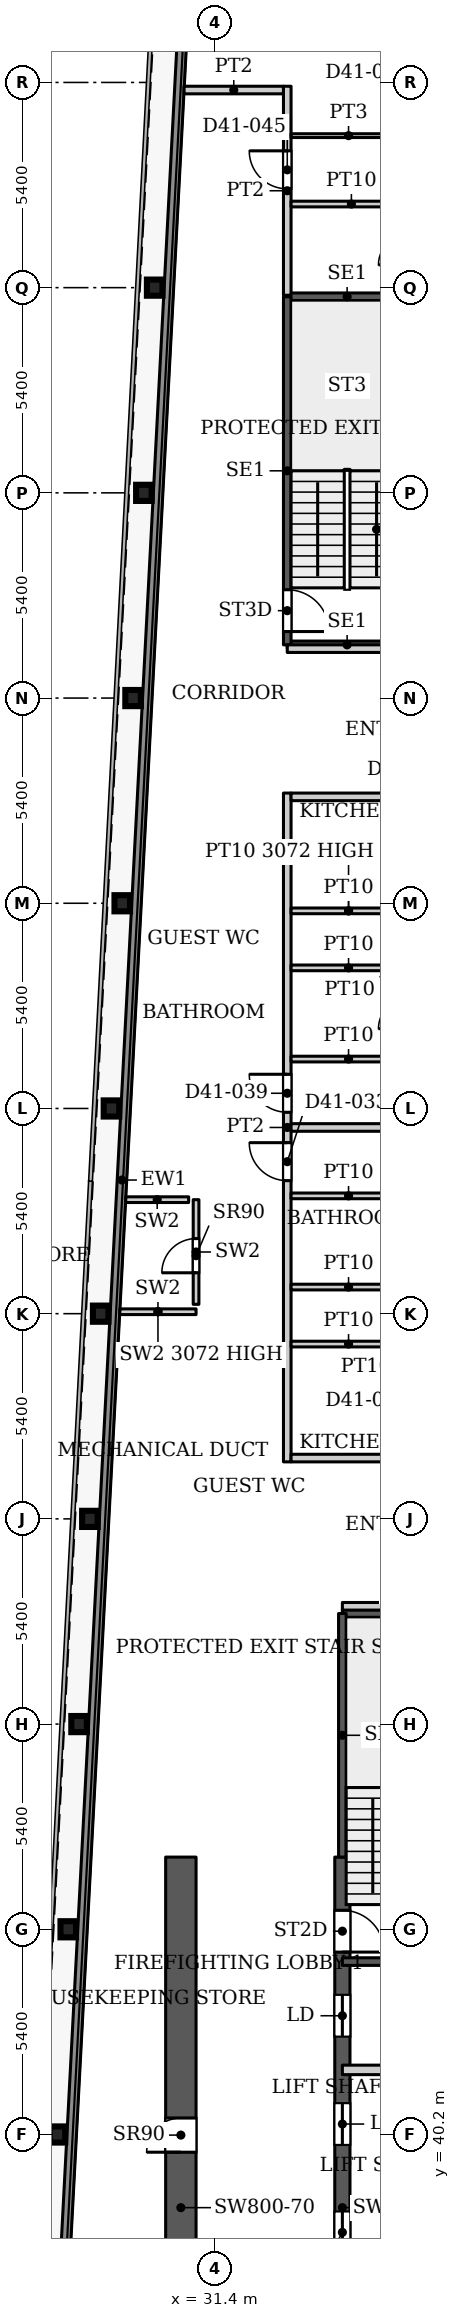
"""IFC4 building model, lengths in metres.
Left out: names, types, materials, properties, quantities, classifications, styles, units other than length and angle.
Written with IfcOpenShell. Run it as: python <this file> out.ifc"""

import sys

from ifc_helpers import new_model, si_unit, direction, frame, frame_2d, origin, origin_2d, place, context, subcontext, project, spatial, rectangle, i_section, extrude, source, transform, mapped, element, fill, save


model = new_model("IFC4")
c1 = context("Model", 3, precision=1e-05, world=origin(), true_north=direction((0.0, 1.0)))
c2 = subcontext(c1, "Body", "Model", "MODEL_VIEW")
j1 = project(units=[si_unit("LENGTHUNIT", "METRE"), si_unit("PLANEANGLEUNIT", "RADIAN")], contexts=[c1])
p1 = place(None, origin())
s1 = spatial("IfcSite", under=j1, at=p1, CompositionType="ELEMENT")
p2 = place(p1, origin())
s2 = spatial("IfcBuilding", under=s1, at=p2, CompositionType="ELEMENT")
p3 = place(p2, frame((0.0, 0.0, 176.0)))
s3 = spatial("IfcBuildingStorey", under=s2, at=p3, CompositionType="ELEMENT", Elevation=176.0)
for number, where, z_axis, x_axis in (
    (1, (27.253, 40.2, 0.0), (0.0, 0.0, 1.0), (1.0, 0.0, 0.0)),
    (2, (27.537, 45.6, 0.0), (0.0, 0.0, 1.0), (1.0, 0.0, 0.0)),
    (3, (27.822, 51.0, 0.0), (0.0, 0.0, 1.0), (1.0, 0.0, 0.0)),
    (4, (28.106, 56.4, 0.0), (0.0, 0.0, 1.0), (1.0, 0.0, 0.0)),
    (5, (28.39, 61.8, 0.0), (0.0, 0.0, 1.0), (1.0, 0.0, 0.0)),
    (6, (28.674, 67.2, 0.0), (0.0, 0.0, 1.0), (1.0, 0.0, 0.0)),
    (7, (28.958, 72.6, 0.0), (0.0, 0.0, 1.0), (1.0, 0.0, 0.0)),
    (8, (29.243, 78.0, 0.0), (0.0, 0.0, 1.0), (1.0, 0.0, 0.0)),
    (9, (29.527, 83.4, 0.0), (0.0, 0.0, 1.0), (1.0, 0.0, 0.0)),
    (10, (29.811, 88.8, 0.0), (0.0, 0.0, 1.0), (1.0, 0.0, 0.0)),
):
    element("IfcColumn", number, at=place(p3, frame(where, z_axis=z_axis, x_axis=x_axis)), inside=s3, PredefinedType="COLUMN", context=c2, shape_type="SweptSolid", body=[
        extrude(i_section(OverallWidth=0.409, OverallDepth=0.425, WebThickness=0.033, FlangeThickness=0.052, FilletRadius=0.013, at=origin_2d()), origin(), (0.0, 0.0, 1.0), 3.9),
    ])
p4 = place(p3, frame((34.75, 29.05, 0.0), z_axis=(0.0, 0.0, 1.0), x_axis=(0.0, 1.0, 0.0)))
e11 = element("IfcWall", 11, at=p4, inside=s3, PredefinedType="SHEAR", context=c2, shape_type="SweptSolid", body=[
    extrude(rectangle(XDim=18.45, YDim=0.4, at=frame_2d((9.225, 0.0))), origin(), (0.0, 0.0, 1.0), 3.9),
])
p5 = place(p4, frame((8.025, 0.0, 0.0)))
e12 = element("IfcOpeningElement", 12, at=p5, cuts=e11, PredefinedType="OPENING", context=c2, shape_type="SweptSolid", body=[
    extrude(rectangle(XDim=1.1, YDim=2.2, at=frame_2d((0.55, 1.1))), frame((0.0, 0.21, 0.0), z_axis=(0.0, -1.0, 0.0), x_axis=(1.0, 0.0, 0.0)), (0.0, 0.0, 1.0), 0.42),
])
p6 = place(p4, frame((10.875, 0.0, 0.0)))
e13 = element("IfcOpeningElement", 13, at=p6, cuts=e11, PredefinedType="OPENING", context=c2, shape_type="SweptSolid", body=[
    extrude(rectangle(XDim=1.1, YDim=2.2, at=frame_2d((0.55, 1.1))), frame((0.0, 0.21, 0.0), z_axis=(0.0, -1.0, 0.0), x_axis=(1.0, 0.0, 0.0)), (0.0, 0.0, 1.0), 0.42),
])
p7 = place(p4, frame((13.725, 0.0, 0.0)))
e14 = element("IfcOpeningElement", 14, at=p7, cuts=e11, PredefinedType="OPENING", context=c2, shape_type="SweptSolid", body=[
    extrude(rectangle(XDim=1.1, YDim=2.2, at=frame_2d((0.55, 1.1))), frame((0.0, 0.21, 0.0), z_axis=(0.0, -1.0, 0.0), x_axis=(1.0, 0.0, 0.0)), (0.0, 0.0, 1.0), 0.42),
])
p8 = place(p4, frame((15.95, 0.0, 0.0)))
e15 = element("IfcOpeningElement", 15, at=p8, cuts=e11, PredefinedType="OPENING", context=c2, shape_type="SweptSolid", body=[
    extrude(rectangle(XDim=1.1, YDim=2.2, at=frame_2d((0.55, 1.1))), frame((0.0, 0.21, 0.0), z_axis=(0.0, -1.0, 0.0), x_axis=(1.0, 0.0, 0.0)), (0.0, 0.0, 1.0), 0.42),
])
p9 = place(p3, frame((30.5, 29.05, 0.0), z_axis=(0.0, 0.0, 1.0), x_axis=(0.0, 1.0, 0.0)))
e16 = element("IfcWall", 16, at=p9, inside=s3, PredefinedType="SHEAR", context=c2, shape_type="SweptSolid", body=[
    extrude(rectangle(XDim=18.45, YDim=0.8, at=frame_2d((9.225, 0.0))), origin(), (0.0, 0.0, 1.0), 3.9),
])
p10 = place(p9, frame((6.21, 0.0, 0.0)))
e17 = element("IfcOpeningElement", 17, at=p10, cuts=e16, PredefinedType="OPENING", context=c2, shape_type="SweptSolid", body=[
    extrude(rectangle(XDim=0.9, YDim=2.2, at=frame_2d((0.45, 1.1))), frame((0.0, 0.41, 0.0), z_axis=(0.0, -1.0, 0.0), x_axis=(1.0, 0.0, 0.0)), (0.0, 0.0, 1.0), 0.82),
])
p11 = place(p9, frame((10.684, 0.0, 0.0)))
e18 = element("IfcOpeningElement", 18, at=p11, cuts=e16, PredefinedType="OPENING", context=c2, shape_type="SweptSolid", body=[
    extrude(rectangle(XDim=0.9, YDim=2.2, at=frame_2d((0.45, 1.1))), frame((0.0, 0.41, 0.0), z_axis=(0.0, -1.0, 0.0), x_axis=(1.0, 0.0, 0.0)), (0.0, 0.0, 1.0), 0.82),
])
p12 = place(p3, frame((27.195, 31.969, 0.0), z_axis=(0.0, 0.0, 1.0), x_axis=(0.052554995867, 0.998618031286, 0.0)))
e19 = element("IfcWall", 19, at=p12, inside=s3, PredefinedType="SOLIDWALL", context=c2, shape_type="SweptSolid", body=[
    extrude(rectangle(XDim=66.787, YDim=0.25, at=frame_2d((33.394, 0.0))), origin(), (0.0, 0.0, 1.0), 3.75),
])
for number, where, z_axis, x_axis in (
    (20, (34.75, 44.75, 0.0), (0.0, 0.0, 1.0), (1.0, 0.0, 0.0)),
    (21, (34.75, 53.91, 0.0), (0.0, 0.0, 1.0), (1.0, 0.0, 0.0)),
):
    element("IfcWall", number, at=place(p3, frame(where, z_axis=z_axis, x_axis=x_axis)), inside=s3, PredefinedType="SHEAR", context=c2, shape_type="SweptSolid", body=[
        extrude(rectangle(XDim=3.15, YDim=0.2, at=frame_2d((1.575, 0.0))), origin(), (0.0, 0.0, 1.0), 3.9),
    ])
p13 = place(p3, frame((34.75, 47.5, 0.0), z_axis=(0.0, 0.0, 1.0), x_axis=(0.0, 1.0, 0.0)))
e22 = element("IfcWall", 22, at=p13, inside=s3, PredefinedType="SHEAR", context=c2, shape_type="SweptSolid", body=[
    extrude(rectangle(XDim=6.41, YDim=0.2, at=frame_2d((3.205, 0.0))), origin(), (0.0, 0.0, 1.0), 3.9),
])
for number, where, z_axis, x_axis in (
    (23, (33.3, 79.4, 0.0), (0.0, 0.0, 1.0), (1.0, 0.0, 0.0)),
    (24, (33.3, 88.56, 0.0), (0.0, 0.0, 1.0), (1.0, 0.0, 0.0)),
):
    element("IfcWall", number, at=place(p3, frame(where, z_axis=z_axis, x_axis=x_axis)), inside=s3, PredefinedType="SHEAR", context=c2, shape_type="SweptSolid", body=[
        extrude(rectangle(XDim=3.15, YDim=0.2, at=frame_2d((1.575, 0.0))), origin(), (0.0, 0.0, 1.0), 3.9),
    ])
p14 = place(p3, frame((33.3, 79.4, 0.0), z_axis=(0.0, 0.0, 1.0), x_axis=(0.0, 1.0, 0.0)))
e25 = element("IfcWall", 25, at=p14, inside=s3, PredefinedType="SHEAR", context=c2, shape_type="SweptSolid", body=[
    extrude(rectangle(XDim=9.16, YDim=0.2, at=frame_2d((4.58, 0.0))), origin(), (0.0, 0.0, 1.0), 3.9),
])
p15 = place(p14, frame((0.35, 0.0, 0.0)))
e26 = element("IfcOpeningElement", 26, at=p15, cuts=e25, PredefinedType="OPENING", context=c2, shape_type="SweptSolid", body=[
    extrude(rectangle(XDim=1.1, YDim=2.2, at=frame_2d((0.55, 1.1))), frame((0.0, 0.11, 0.0), z_axis=(0.0, -1.0, 0.0), x_axis=(1.0, 0.0, 0.0)), (0.0, 0.0, 1.0), 0.22),
])
p16 = place(p3, frame((34.75, 41.9, 0.0), z_axis=(0.0, 0.0, 1.0), x_axis=(1.0, 0.0, 0.0)))
e27 = element("IfcWall", 27, at=p16, inside=s3, PredefinedType="PARTITIONING", context=c2, shape_type="SweptSolid", body=[
    extrude(rectangle(XDim=3.25, YDim=0.25, at=frame_2d((1.625, 0.0))), origin(), (0.0, 0.0, 1.0), 3.9),
])
p17 = place(p3, frame((28.895, 61.851, 0.0), z_axis=(0.0, 0.0, 1.0), x_axis=(1.0, 0.0, 0.0)))
e28 = element("IfcWall", 28, at=p17, inside=s3, PredefinedType="PARTITIONING", context=c2, shape_type="SweptSolid", body=[
    extrude(rectangle(XDim=2.005, YDim=0.15, at=frame_2d((1.002, 0.0))), origin(), (0.0, 0.0, 1.0), 3.072),
])
p18 = place(p3, frame((30.9, 62.046, 0.0), z_axis=(0.0, 0.0, 1.0), x_axis=(0.0, 1.0, 0.0)))
e29 = element("IfcWall", 29, at=p18, inside=s3, PredefinedType="PARTITIONING", context=c2, shape_type="SweptSolid", body=[
    extrude(rectangle(XDim=2.754, YDim=0.15, at=frame_2d((1.377, 0.0))), origin(), (0.0, 0.0, 1.0), 3.9),
])
p19 = place(p18, frame((0.83, 0.0, 0.0)))
e30 = element("IfcOpeningElement", 30, at=p19, cuts=e29, PredefinedType="OPENING", context=c2, shape_type="SweptSolid", body=[
    extrude(rectangle(XDim=0.9, YDim=2.2, at=frame_2d((0.45, 1.1))), frame((0.0, 0.085, 0.0), z_axis=(0.0, -1.0, 0.0), x_axis=(1.0, 0.0, 0.0)), (0.0, 0.0, 1.0), 0.17),
])
p20 = place(p3, frame((29.05, 64.8, 0.0), z_axis=(0.0, 0.0, 1.0), x_axis=(1.0, 0.0, 0.0)))
e31 = element("IfcWall", 31, at=p20, inside=s3, PredefinedType="PARTITIONING", context=c2, shape_type="SweptSolid", body=[
    extrude(rectangle(XDim=1.655, YDim=0.15, at=frame_2d((0.828, 0.0))), origin(), (0.0, 0.0, 1.0), 3.9),
])
p21 = place(p3, frame((30.585, 94.0, 0.0), z_axis=(0.0, 0.0, 1.0), x_axis=(1.0, 0.0, 0.0)))
e32 = element("IfcWall", 32, at=p21, inside=s3, PredefinedType="PARTITIONING", context=c2, shape_type="SweptSolid", body=[
    extrude(rectangle(XDim=2.615, YDim=0.2, at=frame_2d((1.308, 0.0))), origin(), (0.0, 0.0, 1.0), 3.6),
])
p22 = place(p3, frame((33.3, 57.9, 0.0), z_axis=(0.0, 0.0, 1.0), x_axis=(0.0, 1.0, 0.0)))
e33 = element("IfcWall", 33, at=p22, inside=s3, PredefinedType="PARTITIONING", context=c2, shape_type="SweptSolid", body=[
    extrude(rectangle(XDim=17.6, YDim=0.2, at=frame_2d((8.8, 0.0))), origin(), (0.0, 0.0, 1.0), 3.6),
])
p23 = place(p22, frame((7.4, 0.0, 0.0)))
e34 = element("IfcOpeningElement", 34, at=p23, cuts=e33, PredefinedType="OPENING", context=c2, shape_type="SweptSolid", body=[
    extrude(rectangle(XDim=1.0, YDim=2.1, at=frame_2d((0.5, 1.05))), frame((0.0, 0.11, 0.0), z_axis=(0.0, -1.0, 0.0), x_axis=(1.0, 0.0, 0.0)), (0.0, 0.0, 1.0), 0.22),
])
p24 = place(p22, frame((9.2, 0.0, 0.0)))
e35 = element("IfcOpeningElement", 35, at=p24, cuts=e33, PredefinedType="OPENING", context=c2, shape_type="SweptSolid", body=[
    extrude(rectangle(XDim=1.0, YDim=2.1, at=frame_2d((0.5, 1.05))), frame((0.0, 0.11, 0.0), z_axis=(0.0, -1.0, 0.0), x_axis=(1.0, 0.0, 0.0)), (0.0, 0.0, 1.0), 0.22),
])
p25 = place(p3, frame((33.3, 79.3, 0.0), z_axis=(0.0, 0.0, 1.0), x_axis=(1.0, 0.0, 0.0)))
e36 = element("IfcWall", 36, at=p25, inside=s3, PredefinedType="PARTITIONING", context=c2, shape_type="SweptSolid", body=[
    extrude(rectangle(XDim=12.6, YDim=0.2, at=frame_2d((6.3, 0.0))), origin(), (0.0, 0.0, 1.0), 3.6),
])
p26 = place(p25, frame((5.795, 0.0, 0.0)))
e37 = element("IfcOpeningElement", 37, at=p26, cuts=e36, PredefinedType="OPENING", context=c2, shape_type="SweptSolid", body=[
    extrude(rectangle(XDim=1.0, YDim=2.1, at=frame_2d((0.5, 1.05))), frame((0.0, 0.11, 0.0), z_axis=(0.0, -1.0, 0.0), x_axis=(1.0, 0.0, 0.0)), (0.0, 0.0, 1.0), 0.22),
])
p27 = place(p3, frame((33.3, 88.6, 0.0), z_axis=(0.0, 0.0, 1.0), x_axis=(0.0, 1.0, 0.0)))
e38 = element("IfcWall", 38, at=p27, inside=s3, PredefinedType="PARTITIONING", context=c2, shape_type="SweptSolid", body=[
    extrude(rectangle(XDim=5.5, YDim=0.2, at=frame_2d((2.75, 0.0))), origin(), (0.0, 0.0, 1.0), 3.6),
])
p28 = place(p27, frame((2.8, 0.0, 0.0)))
e39 = element("IfcOpeningElement", 39, at=p28, cuts=e38, PredefinedType="OPENING", context=c2, shape_type="SweptSolid", body=[
    extrude(rectangle(XDim=1.0, YDim=2.1, at=frame_2d((0.5, 1.05))), frame((0.0, 0.11, 0.0), z_axis=(0.0, -1.0, 0.0), x_axis=(1.0, 0.0, 0.0)), (0.0, 0.0, 1.0), 0.22),
])
p29 = place(p3, frame((33.4, 58.0, 0.0), z_axis=(0.0, 0.0, 1.0), x_axis=(1.0, 0.0, 0.0)))
e40 = element("IfcWall", 40, at=p29, inside=s3, PredefinedType="PARTITIONING", context=c2, shape_type="SweptSolid", body=[
    extrude(rectangle(XDim=12.5, YDim=0.2, at=frame_2d((6.25, 0.0))), origin(), (0.0, 0.0, 1.0), 3.6),
])
for number, where, z_axis, x_axis in (
    (41, (33.4, 61.0, 0.0), (0.0, 0.0, 1.0), (1.0, 0.0, 0.0)),
    (42, (33.4, 62.5, 0.0), (0.0, 0.0, 1.0), (1.0, 0.0, 0.0)),
    (43, (33.4, 64.9, 0.0), (0.0, 0.0, 1.0), (1.0, 0.0, 0.0)),
):
    element("IfcWall", number, at=place(p3, frame(where, z_axis=z_axis, x_axis=x_axis)), inside=s3, PredefinedType="PARTITIONING", context=c2, shape_type="SweptSolid", body=[
        extrude(rectangle(XDim=3.025, YDim=0.15, at=frame_2d((1.513, 0.0))), origin(), (0.0, 0.0, 1.0), 3.6),
    ])
p30 = place(p3, frame((33.4, 66.7, 0.0), z_axis=(0.0, 0.0, 1.0), x_axis=(1.0, 0.0, 0.0)))
e44 = element("IfcWall", 44, at=p30, inside=s3, PredefinedType="PARTITIONING", context=c2, shape_type="SweptSolid", body=[
    extrude(rectangle(XDim=12.5, YDim=0.2, at=frame_2d((6.25, 0.0))), origin(), (0.0, 0.0, 1.0), 3.6),
])
for number, where, z_axis, x_axis in (
    (45, (33.4, 68.5, 0.0), (0.0, 0.0, 1.0), (1.0, 0.0, 0.0)),
    (46, (33.4, 70.9, 0.0), (0.0, 0.0, 1.0), (1.0, 0.0, 0.0)),
):
    element("IfcWall", number, at=place(p3, frame(where, z_axis=z_axis, x_axis=x_axis)), inside=s3, PredefinedType="PARTITIONING", context=c2, shape_type="SweptSolid", body=[
        extrude(rectangle(XDim=3.025, YDim=0.15, at=frame_2d((1.513, 0.0))), origin(), (0.0, 0.0, 1.0), 3.6),
    ])
p31 = place(p3, frame((33.4, 72.4, 0.0), z_axis=(0.0, 0.0, 1.0), x_axis=(1.0, 0.0, 0.0)))
e47 = element("IfcWall", 47, at=p31, inside=s3, PredefinedType="PARTITIONING", context=c2, shape_type="SweptSolid", body=[
    extrude(rectangle(XDim=3.025, YDim=0.15, at=frame_2d((1.513, 0.0))), origin(), (0.0, 0.0, 1.0), 3.072),
])
p32 = place(p3, frame((33.4, 75.4, 0.0), z_axis=(0.0, 0.0, 1.0), x_axis=(1.0, 0.0, 0.0)))
e48 = element("IfcWall", 48, at=p32, inside=s3, PredefinedType="PARTITIONING", context=c2, shape_type="SweptSolid", body=[
    extrude(rectangle(XDim=12.5, YDim=0.2, at=frame_2d((6.25, 0.0))), origin(), (0.0, 0.0, 1.0), 3.6),
])
p33 = place(p3, frame((33.4, 91.0, 0.0), z_axis=(0.0, 0.0, 1.0), x_axis=(1.0, 0.0, 0.0)))
e49 = element("IfcWall", 49, at=p33, inside=s3, PredefinedType="PARTITIONING", context=c2, shape_type="SweptSolid", body=[
    extrude(rectangle(XDim=3.175, YDim=0.15, at=frame_2d((1.587, 0.0))), origin(), (0.0, 0.0, 1.0), 3.6),
])
p34 = place(p3, frame((33.4, 92.8, 0.0), z_axis=(0.0, 0.0, 1.0), x_axis=(1.0, 0.0, 0.0)))
e50 = element("IfcWall", 50, at=p34, inside=s3, PredefinedType="PARTITIONING", context=c2, shape_type="SweptSolid", body=[
    extrude(rectangle(XDim=3.025, YDim=0.1, at=frame_2d((1.513, 0.0))), origin(), (0.0, 0.0, 1.0), 3.6),
])
p35 = place(p3, frame((34.75, 54.1, 0.0), z_axis=(0.0, 0.0, 1.0), x_axis=(1.0, 0.0, 0.0)))
e51 = element("IfcWall", 51, at=p35, inside=s3, PredefinedType="PARTITIONING", context=c2, shape_type="SweptSolid", body=[
    extrude(rectangle(XDim=11.15, YDim=0.2, at=frame_2d((5.575, 0.0))), origin(), (0.0, 0.0, 1.0), 3.6),
])
p36 = place(p35, frame((5.075, 0.0, 0.0)))
e52 = element("IfcOpeningElement", 52, at=p36, cuts=e51, PredefinedType="OPENING", context=c2, shape_type="SweptSolid", body=[
    extrude(rectangle(XDim=1.0, YDim=2.1, at=frame_2d((0.5, 1.05))), frame((0.0, 0.11, 0.0), z_axis=(0.0, -1.0, 0.0), x_axis=(1.0, 0.0, 0.0)), (0.0, 0.0, 1.0), 0.22),
])
m1 = source(origin(), c2, "Body", "SweptSolid", [
    extrude(rectangle(XDim=1.1, YDim=2.2, at=frame_2d((0.55, 1.1))), frame((0.0, 0.025, 0.0), z_axis=(0.0, -1.0, 0.0), x_axis=(1.0, 0.0, 0.0)), (0.0, 0.0, 1.0), 0.05),
])
p37 = place(p5, origin())
e53 = element("IfcDoor", 53, at=p37, inside=s3, OperationType="SLIDING_TO_LEFT", PredefinedType="DOOR", context=c2, shape_type="MappedRepresentation", body=[
    mapped(m1, transform((0.0, 0.0, 0.0), x_axis=(1.0, 0.0, 0.0), y_axis=(0.0, 1.0, 0.0), z_axis=(0.0, 0.0, 1.0), scale=1.0)),
])
fill(e12, e53)
p38 = place(p6, origin())
e54 = element("IfcDoor", 54, at=p38, inside=s3, OperationType="SLIDING_TO_LEFT", PredefinedType="DOOR", context=c2, shape_type="MappedRepresentation", body=[
    mapped(m1, transform((0.0, 0.0, 0.0), x_axis=(1.0, 0.0, 0.0), y_axis=(0.0, 1.0, 0.0), z_axis=(0.0, 0.0, 1.0), scale=1.0)),
])
fill(e13, e54)
p39 = place(p7, origin())
e55 = element("IfcDoor", 55, at=p39, inside=s3, OperationType="SLIDING_TO_LEFT", PredefinedType="DOOR", context=c2, shape_type="MappedRepresentation", body=[
    mapped(m1, transform((0.0, 0.0, 0.0), x_axis=(1.0, 0.0, 0.0), y_axis=(0.0, 1.0, 0.0), z_axis=(0.0, 0.0, 1.0), scale=1.0)),
])
fill(e14, e55)
m2 = source(origin(), c2, "Body", "SweptSolid", [
    extrude(rectangle(XDim=0.9, YDim=2.2, at=frame_2d((0.45, 1.1))), frame((0.0, 0.025, 0.0), z_axis=(0.0, -1.0, 0.0), x_axis=(1.0, 0.0, 0.0)), (0.0, 0.0, 1.0), 0.05),
])
p40 = place(p11, origin())
e56 = element("IfcDoor", 56, at=p40, inside=s3, OperationType="SINGLE_SWING_LEFT", PredefinedType="DOOR", context=c2, shape_type="MappedRepresentation", body=[
    mapped(m2, transform((0.0, 0.0, 0.0), x_axis=(1.0, 0.0, 0.0), y_axis=(0.0, 1.0, 0.0), z_axis=(0.0, 0.0, 1.0), scale=1.0)),
])
fill(e18, e56)
p41 = place(p19, origin())
e57 = element("IfcDoor", 57, at=p41, inside=s3, OperationType="SINGLE_SWING_LEFT", PredefinedType="DOOR", context=c2, shape_type="MappedRepresentation", body=[
    mapped(m2, transform((0.0, 0.0, 0.0), x_axis=(1.0, 0.0, 0.0), y_axis=(0.0, 1.0, 0.0), z_axis=(0.0, 0.0, 1.0), scale=1.0)),
])
fill(e30, e57)
m3 = source(origin(), c2, "Body", "SweptSolid", [
    extrude(rectangle(XDim=1.1, YDim=2.2, at=frame_2d((0.55, 1.1))), frame((0.0, 0.025, 0.0), z_axis=(0.0, -1.0, 0.0), x_axis=(1.0, 0.0, 0.0)), (0.0, 0.0, 1.0), 0.05),
])
p42 = place(p8, origin())
e58 = element("IfcDoor", 58, at=p42, inside=s3, OperationType="SINGLE_SWING_RIGHT", PredefinedType="DOOR", context=c2, shape_type="MappedRepresentation", body=[
    mapped(m3, transform((0.0, 0.0, 0.0), x_axis=(1.0, 0.0, 0.0), y_axis=(0.0, 1.0, 0.0), z_axis=(0.0, 0.0, 1.0), scale=1.0)),
])
fill(e15, e58)
p43 = place(p15, origin())
e59 = element("IfcDoor", 59, at=p43, inside=s3, OperationType="SINGLE_SWING_RIGHT", PredefinedType="DOOR", context=c2, shape_type="MappedRepresentation", body=[
    mapped(m3, transform((0.0, 0.0, 0.0), x_axis=(1.0, 0.0, 0.0), y_axis=(0.0, 1.0, 0.0), z_axis=(0.0, 0.0, 1.0), scale=1.0)),
])
fill(e26, e59)
m4 = source(origin(), c2, "Body", "SweptSolid", [
    extrude(rectangle(XDim=1.0, YDim=2.1, at=frame_2d((0.5, 1.05))), frame((0.0, 0.025, 0.0), z_axis=(0.0, -1.0, 0.0), x_axis=(1.0, 0.0, 0.0)), (0.0, 0.0, 1.0), 0.05),
])
p44 = place(p23, origin())
e60 = element("IfcDoor", 60, at=p44, inside=s3, OperationType="SINGLE_SWING_LEFT", PredefinedType="DOOR", context=c2, shape_type="MappedRepresentation", body=[
    mapped(m4, transform((0.0, 0.0, 0.0), x_axis=(1.0, 0.0, 0.0), y_axis=(0.0, 1.0, 0.0), z_axis=(0.0, 0.0, 1.0), scale=1.0)),
])
fill(e34, e60)
p45 = place(p24, origin())
e61 = element("IfcDoor", 61, at=p45, inside=s3, OperationType="SINGLE_SWING_LEFT", PredefinedType="DOOR", context=c2, shape_type="MappedRepresentation", body=[
    mapped(m4, transform((0.0, 0.0, 0.0), x_axis=(1.0, 0.0, 0.0), y_axis=(0.0, 1.0, 0.0), z_axis=(0.0, 0.0, 1.0), scale=1.0)),
])
fill(e35, e61)
p46 = place(p28, origin())
e62 = element("IfcDoor", 62, at=p46, inside=s3, OperationType="SINGLE_SWING_LEFT", PredefinedType="DOOR", context=c2, shape_type="MappedRepresentation", body=[
    mapped(m4, transform((0.0, 0.0, 0.0), x_axis=(1.0, 0.0, 0.0), y_axis=(0.0, 1.0, 0.0), z_axis=(0.0, 0.0, 1.0), scale=1.0)),
])
fill(e39, e62)
save(model, sys.argv[1])
